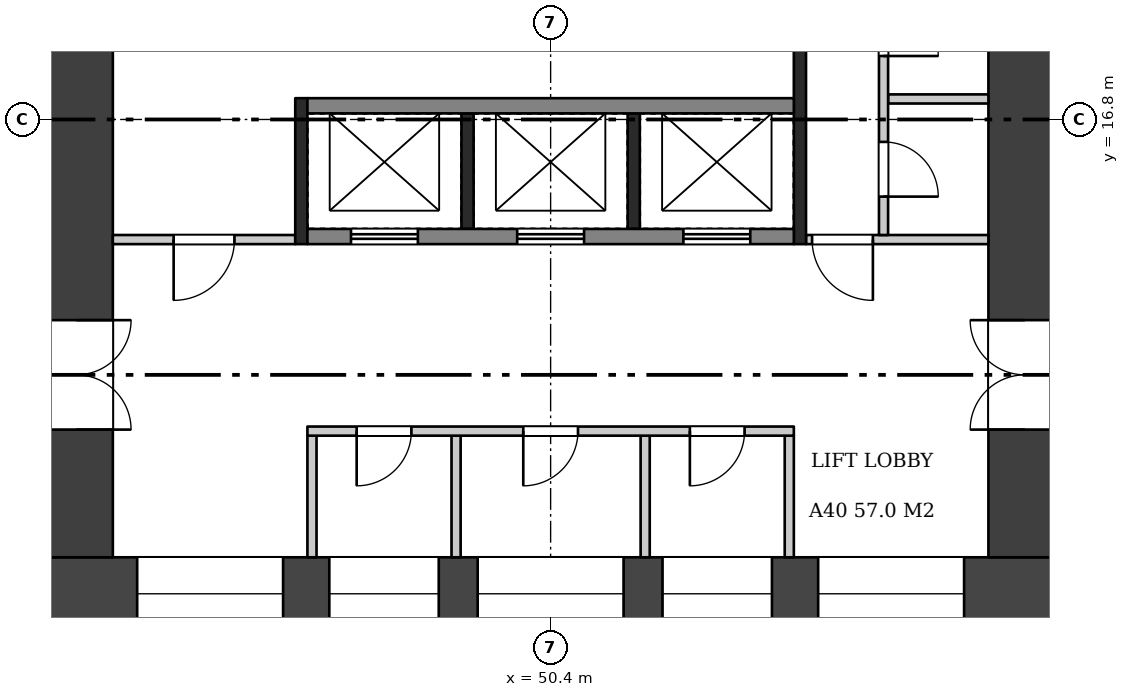
"""IFC4 building model, lengths in metres.
Left out: names, types, materials, properties, quantities, classifications, styles, units other than length and angle.
Written with IfcOpenShell. Run it as: python <this file> out.ifc"""

import sys

from ifc_helpers import new_model, si_unit, direction, frame, frame_2d, origin, place, context, subcontext, project, spatial, rectangle, extrude, element, fill, save


model = new_model("IFC4")
c1 = context("Model", 3, precision=1e-05, world=origin(), true_north=direction((0.0, 1.0)))
c2 = subcontext(c1, "Body", "Model", "MODEL_VIEW")
j1 = project(units=[si_unit("LENGTHUNIT", "METRE"), si_unit("PLANEANGLEUNIT", "RADIAN")], contexts=[c1])
p1 = place(None, origin())
s1 = spatial("IfcSite", under=j1, at=p1, CompositionType="ELEMENT")
p2 = place(p1, origin())
s2 = spatial("IfcBuilding", under=s1, at=p2, CompositionType="ELEMENT")
p3 = place(p2, frame((0.0, 0.0, 158.2)))
s3 = spatial("IfcBuildingStorey", under=s2, at=p3, CompositionType="ELEMENT", Elevation=158.2)
p4 = place(p3, frame((42.0, 9.0, 0.0), z_axis=(0.0, 0.0, 1.0), x_axis=(1.0, 0.0, 0.0)))
e1 = element("IfcWall", 1, at=p4, inside=s3, PredefinedType="SHEAR", context=c2, shape_type="SweptSolid", body=[
    extrude(rectangle(XDim=16.8, YDim=1.2, at=frame_2d((8.4, 0.0))), origin(), (0.0, 0.0, 1.0), 3.22),
])
p5 = place(p4, frame((1.6, 0.0, 0.6)))
e2 = element("IfcOpeningElement", 2, at=p5, cuts=e1, PredefinedType="OPENING", context=c2, shape_type="SweptSolid", body=[
    extrude(rectangle(XDim=2.4, YDim=2.1, at=frame_2d((1.2, 1.05))), frame((0.0, 0.61, 0.0), z_axis=(0.0, -1.0, 0.0), x_axis=(1.0, 0.0, 0.0)), (0.0, 0.0, 1.0), 1.22),
])
p6 = place(p4, frame((4.76, 0.0, 1.6)))
e3 = element("IfcOpeningElement", 3, at=p6, cuts=e1, PredefinedType="OPENING", context=c2, shape_type="SweptSolid", body=[
    extrude(rectangle(XDim=1.8, YDim=1.2, at=frame_2d((0.9, 0.6))), frame((0.0, 0.61, 0.0), z_axis=(0.0, -1.0, 0.0), x_axis=(1.0, 0.0, 0.0)), (0.0, 0.0, 1.0), 1.22),
])
p7 = place(p4, frame((7.2, 0.0, 1.6)))
e4 = element("IfcOpeningElement", 4, at=p7, cuts=e1, PredefinedType="OPENING", context=c2, shape_type="SweptSolid", body=[
    extrude(rectangle(XDim=2.4, YDim=1.2, at=frame_2d((1.2, 0.6))), frame((0.0, 0.61, 0.0), z_axis=(0.0, -1.0, 0.0), x_axis=(1.0, 0.0, 0.0)), (0.0, 0.0, 1.0), 1.22),
])
p8 = place(p4, frame((10.24, 0.0, 1.6)))
e5 = element("IfcOpeningElement", 5, at=p8, cuts=e1, PredefinedType="OPENING", context=c2, shape_type="SweptSolid", body=[
    extrude(rectangle(XDim=1.8, YDim=1.2, at=frame_2d((0.9, 0.6))), frame((0.0, 0.61, 0.0), z_axis=(0.0, -1.0, 0.0), x_axis=(1.0, 0.0, 0.0)), (0.0, 0.0, 1.0), 1.22),
])
p9 = place(p4, frame((12.8, 0.0, 0.6)))
e6 = element("IfcOpeningElement", 6, at=p9, cuts=e1, PredefinedType="OPENING", context=c2, shape_type="SweptSolid", body=[
    extrude(rectangle(XDim=2.4, YDim=2.1, at=frame_2d((1.2, 1.05))), frame((0.0, 0.61, 0.0), z_axis=(0.0, -1.0, 0.0), x_axis=(1.0, 0.0, 0.0)), (0.0, 0.0, 1.0), 1.22),
])
p10 = place(p3, frame((42.6, 9.6, 0.0), z_axis=(0.0, 0.0, 1.0), x_axis=(0.0, 1.0, 0.0)))
e7 = element("IfcWall", 7, at=p10, inside=s3, PredefinedType="SHEAR", context=c2, shape_type="SweptSolid", body=[
    extrude(rectangle(XDim=14.4, YDim=1.2, at=frame_2d((7.2, 0.0))), origin(), (0.0, 0.0, 1.0), 3.22),
])
p11 = place(p10, frame((2.1, 0.0, 0.0)))
e8 = element("IfcOpeningElement", 8, at=p11, cuts=e7, PredefinedType="OPENING", context=c2, shape_type="SweptSolid", body=[
    extrude(rectangle(XDim=1.8, YDim=2.1, at=frame_2d((0.9, 1.05))), frame((0.0, 0.61, 0.0), z_axis=(0.0, -1.0, 0.0), x_axis=(1.0, 0.0, 0.0)), (0.0, 0.0, 1.0), 1.22),
])
p12 = place(p3, frame((58.2, 9.6, 0.0), z_axis=(0.0, 0.0, 1.0), x_axis=(0.0, 1.0, 0.0)))
e9 = element("IfcWall", 9, at=p12, inside=s3, PredefinedType="SHEAR", context=c2, shape_type="SweptSolid", body=[
    extrude(rectangle(XDim=14.4, YDim=1.2, at=frame_2d((7.2, 0.0))), origin(), (0.0, 0.0, 1.0), 3.22),
])
p13 = place(p12, frame((2.1, 0.0, 0.0)))
e10 = element("IfcOpeningElement", 10, at=p13, cuts=e9, PredefinedType="OPENING", context=c2, shape_type="SweptSolid", body=[
    extrude(rectangle(XDim=1.8, YDim=2.1, at=frame_2d((0.9, 1.05))), frame((0.0, 0.61, 0.0), z_axis=(0.0, -1.0, 0.0), x_axis=(1.0, 0.0, 0.0)), (0.0, 0.0, 1.0), 1.22),
])
for number, where, z_axis, x_axis in (
    (11, (46.475, 9.6, 0.0), (0.0, 0.0, 1.0), (0.0, 1.0, 0.0)),
    (12, (54.325, 9.6, 0.0), (0.0, 0.0, 1.0), (0.0, 1.0, 0.0)),
    (13, (48.845, 9.6, 0.0), (0.0, 0.0, 1.0), (0.0, 1.0, 0.0)),
    (14, (51.955, 9.6, 0.0), (0.0, 0.0, 1.0), (0.0, 1.0, 0.0)),
):
    element("IfcWall", number, at=place(p3, frame(where, z_axis=z_axis, x_axis=x_axis)), inside=s3, PredefinedType="PARTITIONING", context=c2, shape_type="SweptSolid", body=[
        extrude(rectangle(XDim=2.0, YDim=0.15, at=frame_2d((1.0, 0.0))), origin(), (0.0, 0.0, 1.0), 3.22),
    ])
p14 = place(p3, frame((46.4, 11.675, 0.0), z_axis=(0.0, 0.0, 1.0), x_axis=(1.0, 0.0, 0.0)))
e15 = element("IfcWall", 15, at=p14, inside=s3, PredefinedType="PARTITIONING", context=c2, shape_type="SweptSolid", body=[
    extrude(rectangle(XDim=8.0, YDim=0.15, at=frame_2d((4.0, 0.0))), origin(), (0.0, 0.0, 1.0), 3.22),
])
p15 = place(p14, frame((0.81, 0.0, 0.0)))
e16 = element("IfcOpeningElement", 16, at=p15, cuts=e15, PredefinedType="OPENING", context=c2, shape_type="SweptSolid", body=[
    extrude(rectangle(XDim=0.9, YDim=2.1, at=frame_2d((0.45, 1.05))), frame((0.0, 0.085, 0.0), z_axis=(0.0, -1.0, 0.0), x_axis=(1.0, 0.0, 0.0)), (0.0, 0.0, 1.0), 0.17),
])
p16 = place(p14, frame((3.55, 0.0, 0.0)))
e17 = element("IfcOpeningElement", 17, at=p16, cuts=e15, PredefinedType="OPENING", context=c2, shape_type="SweptSolid", body=[
    extrude(rectangle(XDim=0.9, YDim=2.1, at=frame_2d((0.45, 1.05))), frame((0.0, 0.085, 0.0), z_axis=(0.0, -1.0, 0.0), x_axis=(1.0, 0.0, 0.0)), (0.0, 0.0, 1.0), 0.17),
])
p17 = place(p14, frame((6.29, 0.0, 0.0)))
e18 = element("IfcOpeningElement", 18, at=p17, cuts=e15, PredefinedType="OPENING", context=c2, shape_type="SweptSolid", body=[
    extrude(rectangle(XDim=0.9, YDim=2.1, at=frame_2d((0.45, 1.05))), frame((0.0, 0.085, 0.0), z_axis=(0.0, -1.0, 0.0), x_axis=(1.0, 0.0, 0.0)), (0.0, 0.0, 1.0), 0.17),
])
for number, where, z_axis, x_axis in (
    (19, (49.033, 15.0, 0.0), (0.0, 0.0, 1.0), (0.0, 1.0, 0.0)),
    (20, (51.767, 15.0, 0.0), (0.0, 0.0, 1.0), (0.0, 1.0, 0.0)),
):
    element("IfcWall", number, at=place(p3, frame(where, z_axis=z_axis, x_axis=x_axis)), inside=s3, PredefinedType="SHEAR", context=c2, shape_type="SweptSolid", body=[
        extrude(rectangle(XDim=1.9, YDim=0.2, at=frame_2d((0.95, 0.0))), origin(), (0.0, 0.0, 1.0), 3.22),
    ])
p18 = place(p3, frame((46.4, 14.875, 0.0), z_axis=(0.0, 0.0, 1.0), x_axis=(1.0, 0.0, 0.0)))
e21 = element("IfcWall", 21, at=p18, inside=s3, PredefinedType="SHEAR", context=c2, shape_type="SweptSolid", body=[
    extrude(rectangle(XDim=8.0, YDim=0.25, at=frame_2d((4.0, 0.0))), origin(), (0.0, 0.0, 1.0), 3.22),
])
p19 = place(p18, frame((0.717, 0.0, 0.0)))
e22 = element("IfcOpeningElement", 22, at=p19, cuts=e21, PredefinedType="OPENING", context=c2, shape_type="SweptSolid", body=[
    extrude(rectangle(XDim=1.1, YDim=2.1, at=frame_2d((0.55, 1.05))), frame((0.0, 0.135, 0.0), z_axis=(0.0, -1.0, 0.0), x_axis=(1.0, 0.0, 0.0)), (0.0, 0.0, 1.0), 0.27),
])
p20 = place(p18, frame((3.45, 0.0, 0.0)))
e23 = element("IfcOpeningElement", 23, at=p20, cuts=e21, PredefinedType="OPENING", context=c2, shape_type="SweptSolid", body=[
    extrude(rectangle(XDim=1.1, YDim=2.1, at=frame_2d((0.55, 1.05))), frame((0.0, 0.135, 0.0), z_axis=(0.0, -1.0, 0.0), x_axis=(1.0, 0.0, 0.0)), (0.0, 0.0, 1.0), 0.27),
])
p21 = place(p18, frame((6.183, 0.0, 0.0)))
e24 = element("IfcOpeningElement", 24, at=p21, cuts=e21, PredefinedType="OPENING", context=c2, shape_type="SweptSolid", body=[
    extrude(rectangle(XDim=1.1, YDim=2.1, at=frame_2d((0.55, 1.05))), frame((0.0, 0.135, 0.0), z_axis=(0.0, -1.0, 0.0), x_axis=(1.0, 0.0, 0.0)), (0.0, 0.0, 1.0), 0.27),
])
p22 = place(p3, frame((46.4, 17.025, 0.0), z_axis=(0.0, 0.0, 1.0), x_axis=(1.0, 0.0, 0.0)))
e25 = element("IfcWall", 25, at=p22, inside=s3, PredefinedType="SHEAR", context=c2, shape_type="SweptSolid", body=[
    extrude(rectangle(XDim=8.0, YDim=0.25, at=frame_2d((4.0, 0.0))), origin(), (0.0, 0.0, 1.0), 3.22),
])
p23 = place(p3, frame((46.3, 14.75, 0.0), z_axis=(0.0, 0.0, 1.0), x_axis=(0.0, 1.0, 0.0)))
e26 = element("IfcWall", 26, at=p23, inside=s3, PredefinedType="SHEAR", context=c2, shape_type="SweptSolid", body=[
    extrude(rectangle(XDim=2.4, YDim=0.2, at=frame_2d((1.2, 0.0))), origin(), (0.0, 0.0, 1.0), 3.22),
])
p24 = place(p3, frame((43.2, 14.825, 0.0), z_axis=(0.0, 0.0, 1.0), x_axis=(1.0, 0.0, 0.0)))
e27 = element("IfcWall", 27, at=p24, inside=s3, PredefinedType="PARTITIONING", context=c2, shape_type="SweptSolid", body=[
    extrude(rectangle(XDim=3.0, YDim=0.15, at=frame_2d((1.5, 0.0))), origin(), (0.0, 0.0, 1.0), 3.22),
])
p25 = place(p24, frame((1.0, 0.0, 0.0)))
e28 = element("IfcOpeningElement", 28, at=p25, cuts=e27, PredefinedType="OPENING", context=c2, shape_type="SweptSolid", body=[
    extrude(rectangle(XDim=1.0, YDim=2.1, at=frame_2d((0.5, 1.05))), frame((0.0, 0.085, 0.0), z_axis=(0.0, -1.0, 0.0), x_axis=(1.0, 0.0, 0.0)), (0.0, 0.0, 1.0), 0.17),
])
p26 = place(p3, frame((54.5, 14.75, 0.0), z_axis=(0.0, 0.0, 1.0), x_axis=(0.0, 1.0, 0.0)))
e29 = element("IfcWall", 29, at=p26, inside=s3, PredefinedType="SHEAR", context=c2, shape_type="SweptSolid", body=[
    extrude(rectangle(XDim=9.25, YDim=0.2, at=frame_2d((4.625, 0.0))), origin(), (0.0, 0.0, 1.0), 3.22),
])
p27 = place(p3, frame((54.6, 14.825, 0.0), z_axis=(0.0, 0.0, 1.0), x_axis=(1.0, 0.0, 0.0)))
e30 = element("IfcWall", 30, at=p27, inside=s3, PredefinedType="PARTITIONING", context=c2, shape_type="SweptSolid", body=[
    extrude(rectangle(XDim=3.0, YDim=0.15, at=frame_2d((1.5, 0.0))), origin(), (0.0, 0.0, 1.0), 3.22),
])
p28 = place(p27, frame((0.1, 0.0, 0.0)))
e31 = element("IfcOpeningElement", 31, at=p28, cuts=e30, PredefinedType="OPENING", context=c2, shape_type="SweptSolid", body=[
    extrude(rectangle(XDim=1.0, YDim=2.1, at=frame_2d((0.5, 1.05))), frame((0.0, 0.085, 0.0), z_axis=(0.0, -1.0, 0.0), x_axis=(1.0, 0.0, 0.0)), (0.0, 0.0, 1.0), 0.17),
])
p29 = place(p3, frame((55.95, 17.137, 0.0), z_axis=(0.0, 0.0, 1.0), x_axis=(1.0, 0.0, 0.0)))
e32 = element("IfcWall", 32, at=p29, inside=s3, PredefinedType="PARTITIONING", context=c2, shape_type="SweptSolid", body=[
    extrude(rectangle(XDim=1.65, YDim=0.15, at=frame_2d((0.825, 0.0))), origin(), (0.0, 0.0, 1.0), 3.22),
])
p30 = place(p3, frame((55.875, 14.9, 0.0), z_axis=(0.0, 0.0, 1.0), x_axis=(0.0, 1.0, 0.0)))
e33 = element("IfcWall", 33, at=p30, inside=s3, PredefinedType="PARTITIONING", context=c2, shape_type="SweptSolid", body=[
    extrude(rectangle(XDim=9.1, YDim=0.15, at=frame_2d((4.55, 0.0))), origin(), (0.0, 0.0, 1.0), 3.22),
])
p31 = place(p30, frame((0.631, 0.0, 0.0)))
e34 = element("IfcOpeningElement", 34, at=p31, cuts=e33, PredefinedType="OPENING", context=c2, shape_type="SweptSolid", body=[
    extrude(rectangle(XDim=0.9, YDim=2.1, at=frame_2d((0.45, 1.05))), frame((0.0, 0.085, 0.0), z_axis=(0.0, -1.0, 0.0), x_axis=(1.0, 0.0, 0.0)), (0.0, 0.0, 1.0), 0.17),
])
p32 = place(p30, frame((2.944, 0.0, 0.0)))
e35 = element("IfcOpeningElement", 35, at=p32, cuts=e33, PredefinedType="OPENING", context=c2, shape_type="SweptSolid", body=[
    extrude(rectangle(XDim=0.9, YDim=2.1, at=frame_2d((0.45, 1.05))), frame((0.0, 0.085, 0.0), z_axis=(0.0, -1.0, 0.0), x_axis=(1.0, 0.0, 0.0)), (0.0, 0.0, 1.0), 0.17),
])
p33 = place(p30, frame((5.256, 0.0, 0.0)))
e36 = element("IfcOpeningElement", 36, at=p33, cuts=e33, PredefinedType="OPENING", context=c2, shape_type="SweptSolid", body=[
    extrude(rectangle(XDim=0.9, YDim=2.1, at=frame_2d((0.45, 1.05))), frame((0.0, 0.085, 0.0), z_axis=(0.0, -1.0, 0.0), x_axis=(1.0, 0.0, 0.0)), (0.0, 0.0, 1.0), 0.17),
])
p34 = place(p30, frame((7.569, 0.0, 0.0)))
e37 = element("IfcOpeningElement", 37, at=p34, cuts=e33, PredefinedType="OPENING", context=c2, shape_type="SweptSolid", body=[
    extrude(rectangle(XDim=0.9, YDim=2.1, at=frame_2d((0.45, 1.05))), frame((0.0, 0.085, 0.0), z_axis=(0.0, -1.0, 0.0), x_axis=(1.0, 0.0, 0.0)), (0.0, 0.0, 1.0), 0.17),
])
p35 = place(p11, frame((1.8, 0.0, 0.0), z_axis=(0.0, 0.0, 1.0), x_axis=(-1.0, 0.0, 0.0)))
e38 = element("IfcDoor", 38, at=p35, inside=s3, OperationType="DOUBLE_DOOR_SINGLE_SWING", PredefinedType="DOOR", context=c2, shape_type="SweptSolid", body=[
    extrude(rectangle(XDim=1.8, YDim=2.1, at=frame_2d((0.9, 1.05))), frame((0.0, 0.025, 0.0), z_axis=(0.0, -1.0, 0.0), x_axis=(1.0, 0.0, 0.0)), (0.0, 0.0, 1.0), 0.05),
])
fill(e8, e38)
p36 = place(p13, origin())
e39 = element("IfcDoor", 39, at=p36, inside=s3, OperationType="DOUBLE_DOOR_SINGLE_SWING", PredefinedType="DOOR", context=c2, shape_type="SweptSolid", body=[
    extrude(rectangle(XDim=1.8, YDim=2.1, at=frame_2d((0.9, 1.05))), frame((0.0, 0.025, 0.0), z_axis=(0.0, -1.0, 0.0), x_axis=(1.0, 0.0, 0.0)), (0.0, 0.0, 1.0), 0.05),
])
fill(e10, e39)
p37 = place(p15, frame((0.9, 0.0, 0.0), z_axis=(0.0, 0.0, 1.0), x_axis=(-1.0, 0.0, 0.0)))
e40 = element("IfcDoor", 40, at=p37, inside=s3, OperationType="SINGLE_SWING_RIGHT", PredefinedType="DOOR", context=c2, shape_type="SweptSolid", body=[
    extrude(rectangle(XDim=0.9, YDim=2.1, at=frame_2d((0.45, 1.05))), frame((0.0, 0.025, 0.0), z_axis=(0.0, -1.0, 0.0), x_axis=(1.0, 0.0, 0.0)), (0.0, 0.0, 1.0), 0.05),
])
fill(e16, e40)
p38 = place(p16, frame((0.9, 0.0, 0.0), z_axis=(0.0, 0.0, 1.0), x_axis=(-1.0, 0.0, 0.0)))
e41 = element("IfcDoor", 41, at=p38, inside=s3, OperationType="SINGLE_SWING_RIGHT", PredefinedType="DOOR", context=c2, shape_type="SweptSolid", body=[
    extrude(rectangle(XDim=0.9, YDim=2.1, at=frame_2d((0.45, 1.05))), frame((0.0, 0.025, 0.0), z_axis=(0.0, -1.0, 0.0), x_axis=(1.0, 0.0, 0.0)), (0.0, 0.0, 1.0), 0.05),
])
fill(e17, e41)
p39 = place(p17, frame((0.9, 0.0, 0.0), z_axis=(0.0, 0.0, 1.0), x_axis=(-1.0, 0.0, 0.0)))
e42 = element("IfcDoor", 42, at=p39, inside=s3, OperationType="SINGLE_SWING_RIGHT", PredefinedType="DOOR", context=c2, shape_type="SweptSolid", body=[
    extrude(rectangle(XDim=0.9, YDim=2.1, at=frame_2d((0.45, 1.05))), frame((0.0, 0.025, 0.0), z_axis=(0.0, -1.0, 0.0), x_axis=(1.0, 0.0, 0.0)), (0.0, 0.0, 1.0), 0.05),
])
fill(e18, e42)
p40 = place(p19, origin())
e43 = element("IfcDoor", 43, at=p40, inside=s3, OperationType="DOUBLE_DOOR_SLIDING", PredefinedType="DOOR", context=c2, shape_type="SweptSolid", body=[
    extrude(rectangle(XDim=1.1, YDim=2.1, at=frame_2d((0.55, 1.05))), frame((0.0, 0.025, 0.0), z_axis=(0.0, -1.0, 0.0), x_axis=(1.0, 0.0, 0.0)), (0.0, 0.0, 1.0), 0.05),
])
fill(e22, e43)
p41 = place(p20, origin())
e44 = element("IfcDoor", 44, at=p41, inside=s3, OperationType="DOUBLE_DOOR_SLIDING", PredefinedType="DOOR", context=c2, shape_type="SweptSolid", body=[
    extrude(rectangle(XDim=1.1, YDim=2.1, at=frame_2d((0.55, 1.05))), frame((0.0, 0.025, 0.0), z_axis=(0.0, -1.0, 0.0), x_axis=(1.0, 0.0, 0.0)), (0.0, 0.0, 1.0), 0.05),
])
fill(e23, e44)
p42 = place(p21, origin())
e45 = element("IfcDoor", 45, at=p42, inside=s3, OperationType="DOUBLE_DOOR_SLIDING", PredefinedType="DOOR", context=c2, shape_type="SweptSolid", body=[
    extrude(rectangle(XDim=1.1, YDim=2.1, at=frame_2d((0.55, 1.05))), frame((0.0, 0.025, 0.0), z_axis=(0.0, -1.0, 0.0), x_axis=(1.0, 0.0, 0.0)), (0.0, 0.0, 1.0), 0.05),
])
fill(e24, e45)
p43 = place(p25, frame((1.0, 0.0, 0.0), z_axis=(0.0, 0.0, 1.0), x_axis=(-1.0, 0.0, 0.0)))
e46 = element("IfcDoor", 46, at=p43, inside=s3, OperationType="SINGLE_SWING_RIGHT", PredefinedType="DOOR", context=c2, shape_type="SweptSolid", body=[
    extrude(rectangle(XDim=1.0, YDim=2.1, at=frame_2d((0.5, 1.05))), frame((0.0, 0.025, 0.0), z_axis=(0.0, -1.0, 0.0), x_axis=(1.0, 0.0, 0.0)), (0.0, 0.0, 1.0), 0.05),
])
fill(e28, e46)
p44 = place(p28, frame((1.0, 0.0, 0.0), z_axis=(0.0, 0.0, 1.0), x_axis=(-1.0, 0.0, 0.0)))
e47 = element("IfcDoor", 47, at=p44, inside=s3, OperationType="SINGLE_SWING_LEFT", PredefinedType="DOOR", context=c2, shape_type="SweptSolid", body=[
    extrude(rectangle(XDim=1.0, YDim=2.1, at=frame_2d((0.5, 1.05))), frame((0.0, 0.025, 0.0), z_axis=(0.0, -1.0, 0.0), x_axis=(1.0, 0.0, 0.0)), (0.0, 0.0, 1.0), 0.05),
])
fill(e31, e47)
p45 = place(p31, frame((0.9, 0.0, 0.0), z_axis=(0.0, 0.0, 1.0), x_axis=(-1.0, 0.0, 0.0)))
e48 = element("IfcDoor", 48, at=p45, inside=s3, OperationType="SINGLE_SWING_RIGHT", PredefinedType="DOOR", context=c2, shape_type="SweptSolid", body=[
    extrude(rectangle(XDim=0.9, YDim=2.1, at=frame_2d((0.45, 1.05))), frame((0.0, 0.025, 0.0), z_axis=(0.0, -1.0, 0.0), x_axis=(1.0, 0.0, 0.0)), (0.0, 0.0, 1.0), 0.05),
])
fill(e34, e48)
p46 = place(p32, frame((0.9, 0.0, 0.0), z_axis=(0.0, 0.0, 1.0), x_axis=(-1.0, 0.0, 0.0)))
e49 = element("IfcDoor", 49, at=p46, inside=s3, OperationType="SINGLE_SWING_RIGHT", PredefinedType="DOOR", context=c2, shape_type="SweptSolid", body=[
    extrude(rectangle(XDim=0.9, YDim=2.1, at=frame_2d((0.45, 1.05))), frame((0.0, 0.025, 0.0), z_axis=(0.0, -1.0, 0.0), x_axis=(1.0, 0.0, 0.0)), (0.0, 0.0, 1.0), 0.05),
])
fill(e35, e49)
p47 = place(p5, origin())
e50 = element("IfcWindow", 50, at=p47, inside=s3, PartitioningType="SINGLE_PANEL", PredefinedType="WINDOW", context=c2, shape_type="SweptSolid", body=[
    extrude(rectangle(XDim=2.4, YDim=2.1, at=frame_2d((1.2, 1.05))), frame((0.0, 0.03, 0.0), z_axis=(0.0, -1.0, 0.0), x_axis=(1.0, 0.0, 0.0)), (0.0, 0.0, 1.0), 0.06),
])
fill(e2, e50)
p48 = place(p6, origin())
e51 = element("IfcWindow", 51, at=p48, inside=s3, PartitioningType="SINGLE_PANEL", PredefinedType="WINDOW", context=c2, shape_type="SweptSolid", body=[
    extrude(rectangle(XDim=1.8, YDim=1.2, at=frame_2d((0.9, 0.6))), frame((0.0, 0.03, 0.0), z_axis=(0.0, -1.0, 0.0), x_axis=(1.0, 0.0, 0.0)), (0.0, 0.0, 1.0), 0.06),
])
fill(e3, e51)
p49 = place(p7, origin())
e52 = element("IfcWindow", 52, at=p49, inside=s3, PartitioningType="SINGLE_PANEL", PredefinedType="WINDOW", context=c2, shape_type="SweptSolid", body=[
    extrude(rectangle(XDim=2.4, YDim=1.2, at=frame_2d((1.2, 0.6))), frame((0.0, 0.03, 0.0), z_axis=(0.0, -1.0, 0.0), x_axis=(1.0, 0.0, 0.0)), (0.0, 0.0, 1.0), 0.06),
])
fill(e4, e52)
p50 = place(p8, origin())
e53 = element("IfcWindow", 53, at=p50, inside=s3, PartitioningType="SINGLE_PANEL", PredefinedType="WINDOW", context=c2, shape_type="SweptSolid", body=[
    extrude(rectangle(XDim=1.8, YDim=1.2, at=frame_2d((0.9, 0.6))), frame((0.0, 0.03, 0.0), z_axis=(0.0, -1.0, 0.0), x_axis=(1.0, 0.0, 0.0)), (0.0, 0.0, 1.0), 0.06),
])
fill(e5, e53)
p51 = place(p9, origin())
e54 = element("IfcWindow", 54, at=p51, inside=s3, PartitioningType="SINGLE_PANEL", PredefinedType="WINDOW", context=c2, shape_type="SweptSolid", body=[
    extrude(rectangle(XDim=2.4, YDim=2.1, at=frame_2d((1.2, 1.05))), frame((0.0, 0.03, 0.0), z_axis=(0.0, -1.0, 0.0), x_axis=(1.0, 0.0, 0.0)), (0.0, 0.0, 1.0), 0.06),
])
fill(e6, e54)
save(model, sys.argv[1])
